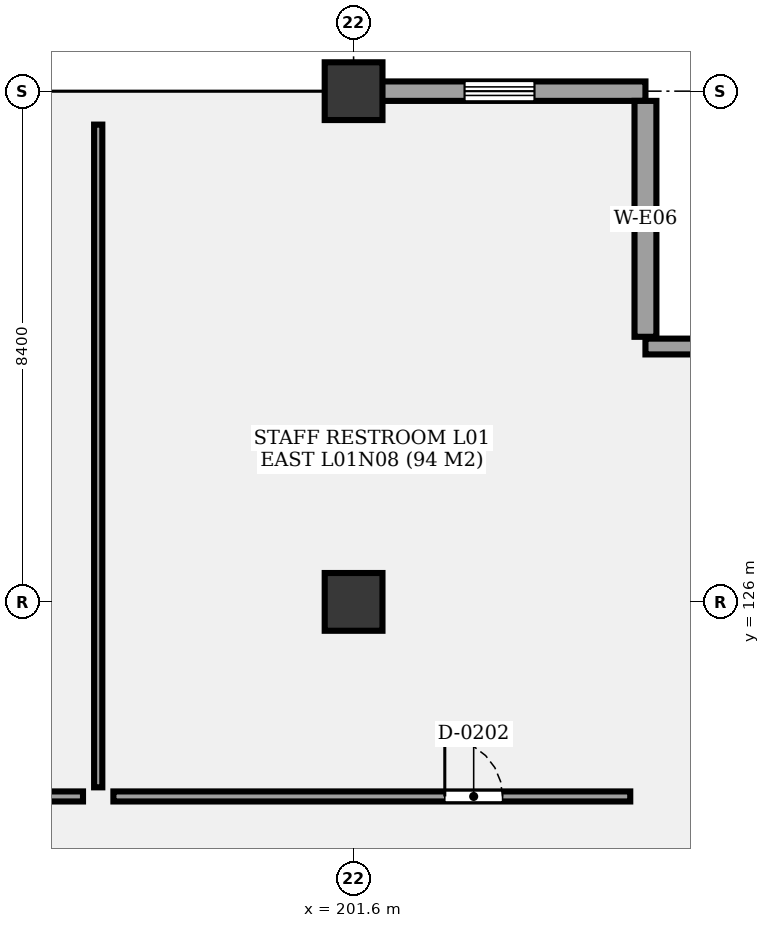
"""IFC4 building model, lengths in metres.
Left out: names, types, materials, properties, quantities, classifications, styles, units other than length and angle.
Written with IfcOpenShell. Run it as: python <this file> out.ifc"""

import sys

from ifc_helpers import new_model, si_unit, direction, frame, frame_2d, origin, origin_2d, place, context, subcontext, project, spatial, rectangle, extrude, element, fill, save


model = new_model("IFC4")
c1 = context("Model", 3, precision=1e-05, world=origin(), true_north=direction((0.0, 1.0)))
c2 = subcontext(c1, "Body", "Model", "MODEL_VIEW")
j1 = project(units=[si_unit("LENGTHUNIT", "METRE"), si_unit("PLANEANGLEUNIT", "RADIAN")], contexts=[c1])
p1 = place(None, origin())
s1 = spatial("IfcSite", under=j1, at=p1, CompositionType="ELEMENT")
p2 = place(p1, origin())
s2 = spatial("IfcBuilding", under=s1, at=p2, CompositionType="ELEMENT")
p3 = place(p2, frame((0.0, 0.0, 5.1)))
s3 = spatial("IfcBuildingStorey", under=s2, at=p3, CompositionType="ELEMENT", Elevation=5.1)
for number, where, z_axis, x_axis in (
    (1, (201.6, 126.0, 0.0), (0.0, 0.0, 1.0), (1.0, 0.0, 0.0)),
    (2, (201.6, 134.4, 0.0), (0.0, 0.0, 1.0), (1.0, 0.0, 0.0)),
):
    element("IfcColumn", number, at=place(p3, frame(where, z_axis=z_axis, x_axis=x_axis)), inside=s3, PredefinedType="COLUMN", context=c2, shape_type="SweptSolid", body=[
        extrude(rectangle(XDim=0.95, YDim=0.95, at=origin_2d()), origin(), (0.0, 0.0, 1.0), 4.8),
    ])
p4 = place(p3, frame((206.4, 130.2, 0.0), z_axis=(0.0, 0.0, 1.0), x_axis=(1.0, 0.0, 0.0)))
e3 = element("IfcWall", 3, at=p4, inside=s3, PredefinedType="SOLIDWALL", context=c2, shape_type="SweptSolid", body=[
    extrude(rectangle(XDim=4.8, YDim=0.26, at=frame_2d((2.4, 0.0))), origin(), (0.0, 0.0, 1.0), 3.94),
])
p5 = place(p4, frame((1.825, 0.0, 0.85)))
e4 = element("IfcOpeningElement", 4, at=p5, cuts=e3, PredefinedType="OPENING", context=c2, shape_type="SweptSolid", body=[
    extrude(rectangle(XDim=1.15, YDim=1.2, at=frame_2d((0.575, 0.6))), frame((0.0, 0.14, 0.0), z_axis=(0.0, -1.0, 0.0), x_axis=(1.0, 0.0, 0.0)), (0.0, 0.0, 1.0), 0.28),
])
p6 = place(p3, frame((201.6, 134.4, 0.0), z_axis=(0.0, 0.0, 1.0), x_axis=(1.0, 0.0, 0.0)))
e5 = element("IfcWall", 5, at=p6, inside=s3, PredefinedType="SOLIDWALL", context=c2, shape_type="SweptSolid", body=[
    extrude(rectangle(XDim=4.8, YDim=0.32, at=frame_2d((2.4, 0.0))), origin(), (0.0, 0.0, 1.0), 3.94),
])
p7 = place(p6, frame((1.825, 0.0, 0.85)))
e6 = element("IfcOpeningElement", 6, at=p7, cuts=e5, PredefinedType="OPENING", context=c2, shape_type="SweptSolid", body=[
    extrude(rectangle(XDim=1.15, YDim=1.2, at=frame_2d((0.575, 0.6))), frame((0.0, 0.17, 0.0), z_axis=(0.0, -1.0, 0.0), x_axis=(1.0, 0.0, 0.0)), (0.0, 0.0, 1.0), 0.34),
])
p8 = place(p3, frame((206.4, 134.24, 0.0), z_axis=(0.0, 0.0, 1.0), x_axis=(0.0, -1.0, 0.0)))
e7 = element("IfcWall", 7, at=p8, inside=s3, PredefinedType="SOLIDWALL", context=c2, shape_type="SweptSolid", body=[
    extrude(rectangle(XDim=3.88, YDim=0.36, at=frame_2d((1.94, 0.0))), origin(), (0.0, 0.0, 1.0), 3.94),
])
p9 = place(p3, frame((188.65, 122.8, 0.0), z_axis=(0.0, 0.0, 1.0), x_axis=(1.0, 0.0, 0.0)))
e8 = element("IfcWall", 8, at=p9, inside=s3, PredefinedType="PARTITIONING", context=c2, shape_type="SweptSolid", body=[
    extrude(rectangle(XDim=8.5, YDim=0.165, at=frame_2d((4.25, 0.0))), origin(), (0.0, 0.0, 1.0), 3.68),
])
p10 = place(p9, frame((5.45, 0.0, 0.0)))
e9 = element("IfcOpeningElement", 9, at=p10, cuts=e8, PredefinedType="OPENING", context=c2, shape_type="SweptSolid", body=[
    extrude(rectangle(XDim=1.25, YDim=2.2, at=frame_2d((0.625, 1.1))), frame((0.0, 0.093, 0.0), z_axis=(0.0, -1.0, 0.0), x_axis=(1.0, 0.0, 0.0)), (0.0, 0.0, 1.0), 0.185),
])
p11 = place(p3, frame((197.65, 122.8, 0.0), z_axis=(0.0, 0.0, 1.0), x_axis=(1.0, 0.0, 0.0)))
e10 = element("IfcWall", 10, at=p11, inside=s3, PredefinedType="PARTITIONING", context=c2, shape_type="SweptSolid", body=[
    extrude(rectangle(XDim=8.5, YDim=0.165, at=frame_2d((4.25, 0.0))), origin(), (0.0, 0.0, 1.0), 3.68),
])
p12 = place(p11, frame((5.45, 0.0, 0.0)))
e11 = element("IfcOpeningElement", 11, at=p12, cuts=e10, PredefinedType="OPENING", context=c2, shape_type="SweptSolid", body=[
    extrude(rectangle(XDim=0.95, YDim=2.1, at=frame_2d((0.475, 1.05))), frame((0.0, 0.093, 0.0), z_axis=(0.0, -1.0, 0.0), x_axis=(1.0, 0.0, 0.0)), (0.0, 0.0, 1.0), 0.185),
])
p13 = place(p3, frame((197.4, 122.95, 0.0), z_axis=(0.0, 0.0, 1.0), x_axis=(0.0, 1.0, 0.0)))
e12 = element("IfcWall", 12, at=p13, inside=s3, PredefinedType="PARTITIONING", context=c2, shape_type="SweptSolid", body=[
    extrude(rectangle(XDim=10.9, YDim=0.135, at=frame_2d((5.45, 0.0))), origin(), (0.0, 0.0, 1.0), 3.68),
])
p14 = place(p7, origin())
e13 = element("IfcWindow", 13, at=p14, inside=s3, PartitioningType="SINGLE_PANEL", PredefinedType="WINDOW", context=c2, shape_type="SweptSolid", body=[
    extrude(rectangle(XDim=1.15, YDim=1.2, at=frame_2d((0.575, 0.6))), frame((0.0, 0.03, 0.0), z_axis=(0.0, -1.0, 0.0), x_axis=(1.0, 0.0, 0.0)), (0.0, 0.0, 1.0), 0.06),
])
fill(e6, e13)
p15 = place(p12, origin())
e14 = element("IfcDoor", 14, at=p15, inside=s3, OperationType="SINGLE_SWING_LEFT", PredefinedType="DOOR", context=c2, shape_type="SweptSolid", body=[
    extrude(rectangle(XDim=0.95, YDim=2.1, at=frame_2d((0.475, 1.05))), frame((0.0, 0.025, 0.0), z_axis=(0.0, -1.0, 0.0), x_axis=(1.0, 0.0, 0.0)), (0.0, 0.0, 1.0), 0.05),
])
fill(e11, e14)
save(model, sys.argv[1])
